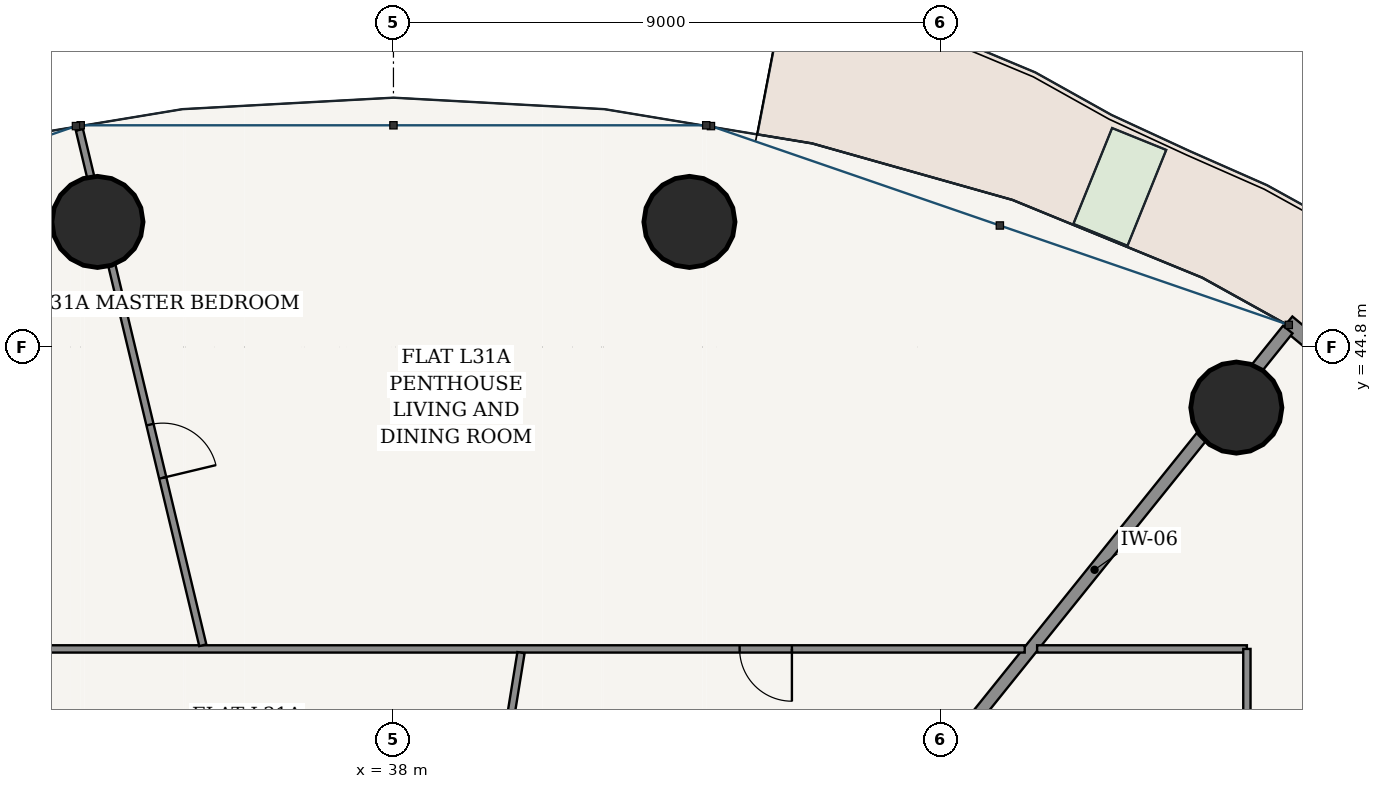
"""IFC4 building model, lengths in metres.
Left out: names, types, materials, properties, quantities, classifications, styles, units other than length and angle.
Written with IfcOpenShell. Run it as: python <this file> out.ifc"""

import sys

from ifc_helpers import new_model, si_unit, direction, frame, frame_2d, origin, origin_2d, place, context, subcontext, project, spatial, rectangle, hollow_circle, extrude, source, transform, mapped, element, fill, save


model = new_model("IFC4")
c1 = context("Model", 3, precision=1e-05, world=origin(), true_north=direction((-0.2419218956, 0.970295726276)))
c2 = subcontext(c1, "Body", "Model", "MODEL_VIEW")
j1 = project(units=[si_unit("LENGTHUNIT", "METRE"), si_unit("PLANEANGLEUNIT", "RADIAN")], contexts=[c1])
p1 = place(None, origin())
s1 = spatial("IfcSite", under=j1, at=p1, CompositionType="ELEMENT")
p2 = place(p1, origin())
s2 = spatial("IfcBuilding", under=s1, at=p2, CompositionType="ELEMENT")
p3 = place(p2, frame((0.0, 0.0, 119.4)))
s3 = spatial("IfcBuildingStorey", under=s2, at=p3, CompositionType="ELEMENT", Elevation=119.4)
for number, where, z_axis, x_axis in (
    (1, (51.862, 43.803, 0.0), (0.0, 0.0, 1.0), (1.0, 0.0, 0.0)),
    (2, (42.867, 46.857, 0.0), (0.0, 0.0, 1.0), (1.0, 0.0, 0.0)),
    (3, (33.133, 46.857, 0.0), (0.0, 0.0, 1.0), (1.0, 0.0, 0.0)),
):
    element("IfcColumn", number, at=place(p3, frame(where, z_axis=z_axis, x_axis=x_axis)), inside=s3, PredefinedType="COLUMN", context=c2, shape_type="SweptSolid", body=[
        extrude(hollow_circle(Radius=0.75, WallThickness=0.045, at=origin_2d()), origin(), (0.0, 0.0, 1.0), 3.6),
    ])
p4 = place(p3, frame((60.154, 39.01, 0.0), z_axis=(0.0, 0.0, 1.0), x_axis=(-0.769242574941, 0.638956853706, 0.0)))
e4 = element("IfcWall", 4, at=p4, inside=s3, PredefinedType="SOLIDWALL", context=c2, shape_type="SweptSolid", body=[
    extrude(rectangle(XDim=9.69, YDim=0.26, at=frame_2d((4.845, 0.0))), origin(), (0.0, 0.0, 1.0), 3.325),
])
p5 = place(p4, frame((4.17, 0.0, 0.0)))
e5 = element("IfcOpeningElement", 5, at=p5, cuts=e4, PredefinedType="OPENING", context=c2, shape_type="SweptSolid", body=[
    extrude(rectangle(XDim=1.35, YDim=2.2, at=frame_2d((0.675, 1.1))), frame((0.0, 0.14, 0.0), z_axis=(0.0, -1.0, 0.0), x_axis=(1.0, 0.0, 0.0)), (0.0, 0.0, 1.0), 0.28),
])
p6 = place(p3, frame((46.352, 37.185, 0.0), z_axis=(0.0, 0.0, 1.0), x_axis=(0.626712884514, 0.779250255299, 0.0)))
e6 = element("IfcWall", 6, at=p6, inside=s3, PredefinedType="PARTITIONING", context=c2, shape_type="SweptSolid", body=[
    extrude(rectangle(XDim=10.141, YDim=0.2, at=frame_2d((5.07, 0.0))), origin(), (0.0, 0.0, 1.0), 2.767),
])
p7 = place(p3, frame((23.965, 39.835, 0.0), z_axis=(0.0, 0.0, 1.0), x_axis=(1.0, 0.0, 0.0)))
e7 = element("IfcWall", 7, at=p7, inside=s3, PredefinedType="PARTITIONING", context=c2, shape_type="SweptSolid", body=[
    extrude(rectangle(XDim=24.416, YDim=0.12, at=frame_2d((12.208, 0.0))), origin(), (0.0, 0.0, 1.0), 2.767),
])
p8 = place(p7, frame((4.192, 0.0, 0.0)))
e8 = element("IfcOpeningElement", 8, at=p8, cuts=e7, PredefinedType="OPENING", context=c2, shape_type="SweptSolid", body=[
    extrude(rectangle(XDim=0.9, YDim=2.15, at=frame_2d((0.45, 1.075))), frame((0.0, 0.07, 0.0), z_axis=(0.0, -1.0, 0.0), x_axis=(1.0, 0.0, 0.0)), (0.0, 0.0, 1.0), 0.14),
])
p9 = place(p7, frame((19.728, 0.0, 0.0)))
e9 = element("IfcOpeningElement", 9, at=p9, cuts=e7, PredefinedType="OPENING", context=c2, shape_type="SweptSolid", body=[
    extrude(rectangle(XDim=0.86, YDim=2.15, at=frame_2d((0.43, 1.075))), frame((0.0, 0.07, 0.0), z_axis=(0.0, -1.0, 0.0), x_axis=(1.0, 0.0, 0.0)), (0.0, 0.0, 1.0), 0.14),
])
p10 = place(p3, frame((34.865, 39.895, 0.0), z_axis=(0.0, 0.0, 1.0), x_axis=(-0.23282725047, 0.97251810854, 0.0)))
e10 = element("IfcWall", 10, at=p10, inside=s3, PredefinedType="PARTITIONING", context=c2, shape_type="SweptSolid", body=[
    extrude(rectangle(XDim=8.715, YDim=0.12, at=frame_2d((4.357, 0.0))), origin(), (0.0, 0.0, 1.0), 2.767),
])
p11 = place(p10, frame((2.831, 0.0, 0.0)))
e11 = element("IfcOpeningElement", 11, at=p11, cuts=e10, PredefinedType="OPENING", context=c2, shape_type="SweptSolid", body=[
    extrude(rectangle(XDim=0.9, YDim=2.15, at=frame_2d((0.45, 1.075))), frame((0.0, 0.07, 0.0), z_axis=(0.0, -1.0, 0.0), x_axis=(1.0, 0.0, 0.0)), (0.0, 0.0, 1.0), 0.14),
])
p12 = place(p3, frame((39.679, 37.185, 0.0), z_axis=(0.0, 0.0, 1.0), x_axis=(0.159580767408, 0.98718487563, 0.0)))
e12 = element("IfcWall", 12, at=p12, inside=s3, PredefinedType="PARTITIONING", context=c2, shape_type="SweptSolid", body=[
    extrude(rectangle(XDim=2.622, YDim=0.12, at=frame_2d((1.311, 0.0))), origin(), (0.0, 0.0, 1.0), 3.325),
])
p13 = place(p3, frame((48.585, 39.835, 0.0), z_axis=(0.0, 0.0, 1.0), x_axis=(1.0, 0.0, 0.0)))
e13 = element("IfcWall", 13, at=p13, inside=s3, PredefinedType="PARTITIONING", context=c2, shape_type="SweptSolid", body=[
    extrude(rectangle(XDim=3.45, YDim=0.12, at=frame_2d((1.725, 0.0))), origin(), (0.0, 0.0, 1.0), 2.767),
])
p14 = place(p3, frame((52.035, 39.835, 0.0), z_axis=(0.0, 0.0, 1.0), x_axis=(0.0, -1.0, 0.0)))
e14 = element("IfcWall", 14, at=p14, inside=s3, PredefinedType="PARTITIONING", context=c2, shape_type="SweptSolid", body=[
    extrude(rectangle(XDim=26.07, YDim=0.12, at=frame_2d((13.035, 0.0))), origin(), (0.0, 0.0, 1.0), 2.767),
])
p15 = place(p14, frame((3.362, 0.0, 0.0)))
e15 = element("IfcOpeningElement", 15, at=p15, cuts=e14, PredefinedType="OPENING", context=c2, shape_type="SweptSolid", body=[
    extrude(rectangle(XDim=0.9, YDim=2.15, at=frame_2d((0.45, 1.075))), frame((0.0, 0.07, 0.0), z_axis=(0.0, -1.0, 0.0), x_axis=(1.0, 0.0, 0.0)), (0.0, 0.0, 1.0), 0.14),
])
p16 = place(p14, frame((13.924, 0.0, 0.0)))
e16 = element("IfcOpeningElement", 16, at=p16, cuts=e14, PredefinedType="OPENING", context=c2, shape_type="SweptSolid", body=[
    extrude(rectangle(XDim=0.9, YDim=2.15, at=frame_2d((0.45, 1.075))), frame((0.0, 0.07, 0.0), z_axis=(0.0, -1.0, 0.0), x_axis=(1.0, 0.0, 0.0)), (0.0, 0.0, 1.0), 0.14),
])
m1 = source(origin(), c2, "Body", "SweptSolid", [
    extrude(rectangle(XDim=0.9, YDim=2.15, at=frame_2d((0.45, 1.075))), frame((0.0, 0.025, 0.0), z_axis=(0.0, -1.0, 0.0), x_axis=(1.0, 0.0, 0.0)), (0.0, 0.0, 1.0), 0.05),
])
p17 = place(p11, frame((0.9, 0.0, 0.0), z_axis=(0.0, 0.0, 1.0), x_axis=(-1.0, 0.0, 0.0)))
e17 = element("IfcDoor", 17, at=p17, inside=s3, OperationType="SINGLE_SWING_RIGHT", PredefinedType="DOOR", context=c2, shape_type="MappedRepresentation", body=[
    mapped(m1, transform((0.0, 0.0, 0.0), scale=1.0)),
])
fill(e11, e17)
m2 = source(origin(), c2, "Body", "SweptSolid", [
    extrude(rectangle(XDim=0.86, YDim=2.15, at=frame_2d((0.43, 1.075))), frame((0.0, 0.025, 0.0), z_axis=(0.0, -1.0, 0.0), x_axis=(1.0, 0.0, 0.0)), (0.0, 0.0, 1.0), 0.05),
])
p18 = place(p9, frame((0.86, 0.0, 0.0), z_axis=(0.0, 0.0, 1.0), x_axis=(-1.0, 0.0, 0.0)))
e18 = element("IfcDoor", 18, at=p18, inside=s3, OperationType="SINGLE_SWING_LEFT", PredefinedType="DOOR", context=c2, shape_type="MappedRepresentation", body=[
    mapped(m2, transform((0.0, 0.0, 0.0), scale=1.0)),
])
fill(e9, e18)
save(model, sys.argv[1])
